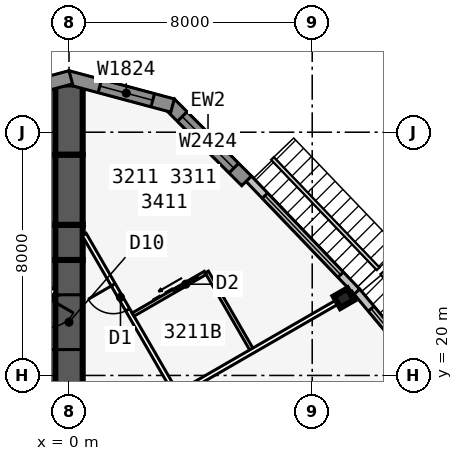
"""IFC4 building model, lengths in metres.
Left out: names, types, materials, properties, quantities, classifications, styles, units other than length and angle.
Written with IfcOpenShell. Run it as: python <this file> out.ifc"""

import sys

from ifc_helpers import new_model, si_unit, direction, frame, frame_2d, origin, origin_2d, place, context, subcontext, project, spatial, polyline, rectangle, i_section, outline, extrude, element, fill, save


model = new_model("IFC4")
c1 = context("Model", 3, precision=1e-05, world=origin(), true_north=direction((0.0, 1.0)))
c2 = subcontext(c1, "Body", "Model", "MODEL_VIEW")
j1 = project(units=[si_unit("LENGTHUNIT", "METRE"), si_unit("PLANEANGLEUNIT", "RADIAN")], contexts=[c1])
p1 = place(None, origin())
s1 = spatial("IfcSite", under=j1, at=p1, CompositionType="ELEMENT")
p2 = place(p1, origin())
s2 = spatial("IfcBuilding", under=s1, at=p2, CompositionType="ELEMENT")
p3 = place(p2, frame((0.0, 0.0, 124.9)))
s3 = spatial("IfcBuildingStorey", under=s2, at=p3, CompositionType="ELEMENT", Elevation=124.9)
p4 = place(p3, frame((0.0, 19.052, 0.0), z_axis=(0.0, 0.0, 1.0), x_axis=(0.0, 1.0, 0.0)))
e1 = element("IfcWall", 1, at=p4, inside=s3, PredefinedType="SHEAR", context=c2, shape_type="SweptSolid", body=[
    extrude(rectangle(XDim=4.746, YDim=0.9, at=frame_2d((2.373, 0.0))), origin(), (0.0, 0.0, 1.0), 3.4),
])
p5 = place(p4, frame((1.8, 0.0, 0.0)))
e2 = element("IfcOpeningElement", 2, at=p5, cuts=e1, PredefinedType="OPENING", context=c2, shape_type="SweptSolid", body=[
    extrude(rectangle(XDim=1.8, YDim=2.13, at=frame_2d((0.9, 1.065))), frame((0.0, 0.46, 0.0), z_axis=(0.0, -1.0, 0.0), x_axis=(1.0, 0.0, 0.0)), (0.0, 0.0, 1.0), 0.92),
])
p6 = place(p3, frame((0.0, 23.799, 0.0), z_axis=(0.0, 0.0, 1.0), x_axis=(0.0, 1.0, 0.0)))
e3 = element("IfcWall", 3, at=p6, inside=s3, PredefinedType="SHEAR", context=c2, shape_type="SweptSolid", body=[
    extrude(rectangle(XDim=1.155, YDim=0.9, at=frame_2d((0.577, 0.0))), origin(), (0.0, 0.0, 1.0), 3.4),
])
p7 = place(p3, frame((0.0, 24.953, 0.0), z_axis=(0.0, 0.0, 1.0), x_axis=(0.0, 1.0, 0.0)))
e4 = element("IfcWall", 4, at=p7, inside=s3, PredefinedType="SHEAR", context=c2, shape_type="SweptSolid", body=[
    extrude(rectangle(XDim=2.309, YDim=0.9, at=frame_2d((1.155, 0.0))), origin(), (0.0, 0.0, 1.0), 3.4),
])
p8 = place(p3, frame((0.0, 27.263, 0.0), z_axis=(0.0, 0.0, 1.0), x_axis=(0.0, 1.0, 0.0)))
e5 = element("IfcWall", 5, at=p8, inside=s3, PredefinedType="SHEAR", context=c2, shape_type="SweptSolid", body=[
    extrude(rectangle(XDim=2.31, YDim=0.9, at=frame_2d((1.155, 0.0))), origin(), (0.0, 0.0, 1.0), 3.4),
])
p9 = place(p3, frame((9.041, 22.541, 0.0), z_axis=(0.0, 0.0, 1.0), x_axis=(-0.5, 0.866025403784, 0.0)))
e6 = element("IfcColumn", 6, at=p9, inside=s3, PredefinedType="COLUMN", context=c2, shape_type="SweptSolid", body=[
    extrude(i_section(OverallWidth=0.437, OverallDepth=0.513, WebThickness=0.061, FlangeThickness=0.097, at=origin_2d()), origin(), (0.0, 0.0, 1.0), 3.4),
])
p10 = place(p3, frame((12.723, 18.868, 0.0), z_axis=(0.0, 0.0, 1.0), x_axis=(-0.641810386606, 0.766863369607, 0.0)))
e7 = element("IfcWall", 7, at=p10, inside=s3, PredefinedType="STANDARD", context=c2, shape_type="SweptSolid", body=[
    extrude(rectangle(XDim=5.076, YDim=0.25, at=frame_2d((2.538, 0.0))), origin(), (0.0, 0.0, 1.0), 3.235),
])
p11 = place(p10, frame((0.738, 0.0, 0.45)))
e8 = element("IfcOpeningElement", 8, at=p11, cuts=e7, PredefinedType="OPENING", context=c2, shape_type="SweptSolid", body=[
    extrude(rectangle(XDim=3.6, YDim=2.4, at=frame_2d((1.8, 1.2))), frame((0.0, 0.135, 0.0), z_axis=(0.0, -1.0, 0.0), x_axis=(1.0, 0.0, 0.0)), (0.0, 0.0, 1.0), 0.27),
])
p12 = place(p3, frame((9.471, 22.754, 0.0), z_axis=(0.0, 0.0, 1.0), x_axis=(-0.691719937936, 0.722165858693, 0.0)))
e9 = element("IfcWall", 9, at=p12, inside=s3, PredefinedType="STANDARD", context=c2, shape_type="SweptSolid", body=[
    extrude(rectangle(XDim=5.148, YDim=0.25, at=frame_2d((2.574, 0.0))), origin(), (0.0, 0.0, 1.0), 3.235),
])
p13 = place(p12, frame((0.774, 0.0, 0.45)))
e10 = element("IfcOpeningElement", 10, at=p13, cuts=e9, PredefinedType="OPENING", context=c2, shape_type="SweptSolid", body=[
    extrude(rectangle(XDim=3.6, YDim=2.4, at=frame_2d((1.8, 1.2))), frame((0.0, 0.135, 0.0), z_axis=(0.0, -1.0, 0.0), x_axis=(1.0, 0.0, 0.0)), (0.0, 0.0, 1.0), 0.27),
])
p14 = place(p3, frame((5.841, 26.399, 0.0), z_axis=(0.0, 0.0, 1.0), x_axis=(-0.707106781187, 0.707106781187, 0.0)))
e11 = element("IfcWall", 11, at=p14, inside=s3, PredefinedType="SOLIDWALL", context=c2, shape_type="SweptSolid", body=[
    extrude(rectangle(XDim=3.586, YDim=0.45, at=frame_2d((1.793, 0.0))), origin(), (0.0, 0.0, 1.0), 3.235),
])
p15 = place(p14, frame((0.593, 0.0, 0.45)))
e12 = element("IfcOpeningElement", 12, at=p15, cuts=e11, PredefinedType="OPENING", context=c2, shape_type="SweptSolid", body=[
    extrude(rectangle(XDim=2.4, YDim=2.4, at=frame_2d((1.2, 1.2))), frame((0.0, 0.235, 0.0), z_axis=(0.0, -1.0, 0.0), x_axis=(1.0, 0.0, 0.0)), (0.0, 0.0, 1.0), 0.47),
])
p16 = place(p3, frame((3.406, 28.877, 0.0), z_axis=(0.0, 0.0, 1.0), x_axis=(-0.965924653531, 0.258823421857, 0.0)))
e13 = element("IfcWall", 13, at=p16, inside=s3, PredefinedType="SOLIDWALL", context=c2, shape_type="SweptSolid", body=[
    extrude(outline(polyline([(3.586, 0.225), (3.527, 0.225), (3.035, 0.093), (3.0, 0.225), (0.0, 0.225), (0.0, -0.225), (3.586, -0.225), (3.586, 0.225)])), origin(), (0.0, 0.0, 1.0), 3.235),
])
p17 = place(p16, frame((0.675, 0.0, 0.45)))
e14 = element("IfcOpeningElement", 14, at=p17, cuts=e13, PredefinedType="OPENING", context=c2, shape_type="SweptSolid", body=[
    extrude(rectangle(XDim=1.8, YDim=2.4, at=frame_2d((0.9, 1.2))), frame((0.0, 0.235, 0.0), z_axis=(0.0, -1.0, 0.0), x_axis=(1.0, 0.0, 0.0)), (0.0, 0.0, 1.0), 0.47),
])
p18 = place(p3, frame((0.058, 29.805, 0.0), z_axis=(0.0, 0.0, 1.0), x_axis=(-0.965924653531, -0.258823421857, 0.0)))
e15 = element("IfcWall", 15, at=p18, inside=s3, PredefinedType="SOLIDWALL", context=c2, shape_type="SweptSolid", body=[
    extrude(outline(polyline([(3.586, 0.225), (0.586, 0.225), (0.551, 0.093), (0.06, 0.225), (0.0, 0.225), (0.0, -0.225), (3.586, -0.225), (3.586, 0.225)])), origin(), (0.0, 0.0, 1.0), 3.235),
])
p19 = place(p18, frame((1.111, 0.0, 0.45)))
e16 = element("IfcOpeningElement", 16, at=p19, cuts=e15, PredefinedType="OPENING", context=c2, shape_type="SweptSolid", body=[
    extrude(rectangle(XDim=1.8, YDim=2.4, at=frame_2d((0.9, 1.2))), frame((0.0, 0.235, 0.0), z_axis=(0.0, -1.0, 0.0), x_axis=(1.0, 0.0, 0.0)), (0.0, 0.0, 1.0), 0.47),
])
p20 = place(p3, frame((21.586, -11.885, 0.0), z_axis=(0.0, 0.0, 1.0), x_axis=(-0.500001915564, 0.86602429783, 0.0)))
e17 = element("IfcWall", 17, at=p20, inside=s3, PredefinedType="PARTITIONING", context=c2, shape_type="SweptSolid", body=[
    extrude(rectangle(XDim=42.172, YDim=0.15, at=frame_2d((21.086, 0.0))), origin(), (0.0, 0.0, 1.0), 3.235),
])
p21 = place(p20, frame((1.911, 0.0, 0.0)))
e18 = element("IfcOpeningElement", 18, at=p21, cuts=e17, PredefinedType="OPENING", context=c2, shape_type="SweptSolid", body=[
    extrude(rectangle(XDim=0.95, YDim=2.13, at=frame_2d((0.475, 1.065))), frame((0.0, 0.085, 0.0), z_axis=(0.0, -1.0, 0.0), x_axis=(1.0, 0.0, 0.0)), (0.0, 0.0, 1.0), 0.17),
])
p22 = place(p20, frame((7.511, 0.0, 0.0)))
e19 = element("IfcOpeningElement", 19, at=p22, cuts=e17, PredefinedType="OPENING", context=c2, shape_type="SweptSolid", body=[
    extrude(rectangle(XDim=0.95, YDim=2.13, at=frame_2d((0.475, 1.065))), frame((0.0, 0.085, 0.0), z_axis=(0.0, -1.0, 0.0), x_axis=(1.0, 0.0, 0.0)), (0.0, 0.0, 1.0), 0.17),
])
p23 = place(p20, frame((14.311, 0.0, 0.0)))
e20 = element("IfcOpeningElement", 20, at=p23, cuts=e17, PredefinedType="OPENING", context=c2, shape_type="SweptSolid", body=[
    extrude(rectangle(XDim=0.95, YDim=2.13, at=frame_2d((0.475, 1.065))), frame((0.0, 0.085, 0.0), z_axis=(0.0, -1.0, 0.0), x_axis=(1.0, 0.0, 0.0)), (0.0, 0.0, 1.0), 0.17),
])
p24 = place(p20, frame((22.511, 0.0, 0.0)))
e21 = element("IfcOpeningElement", 21, at=p24, cuts=e17, PredefinedType="OPENING", context=c2, shape_type="SweptSolid", body=[
    extrude(rectangle(XDim=0.95, YDim=2.13, at=frame_2d((0.475, 1.065))), frame((0.0, 0.085, 0.0), z_axis=(0.0, -1.0, 0.0), x_axis=(1.0, 0.0, 0.0)), (0.0, 0.0, 1.0), 0.17),
])
p25 = place(p20, frame((29.311, 0.0, 0.0)))
e22 = element("IfcOpeningElement", 22, at=p25, cuts=e17, PredefinedType="OPENING", context=c2, shape_type="SweptSolid", body=[
    extrude(rectangle(XDim=0.95, YDim=2.13, at=frame_2d((0.475, 1.065))), frame((0.0, 0.085, 0.0), z_axis=(0.0, -1.0, 0.0), x_axis=(1.0, 0.0, 0.0)), (0.0, 0.0, 1.0), 0.17),
])
p26 = place(p20, frame((39.311, 0.0, 0.0)))
e23 = element("IfcOpeningElement", 23, at=p26, cuts=e17, PredefinedType="OPENING", context=c2, shape_type="SweptSolid", body=[
    extrude(rectangle(XDim=0.95, YDim=2.13, at=frame_2d((0.475, 1.065))), frame((0.0, 0.085, 0.0), z_axis=(0.0, -1.0, 0.0), x_axis=(1.0, 0.0, 0.0)), (0.0, 0.0, 1.0), 0.17),
])
p27 = place(p3, frame((3.608, 19.404, 0.0), z_axis=(0.0, 0.0, 1.0), x_axis=(0.866015989873, 0.500016305018, 0.0)))
e24 = element("IfcWall", 24, at=p27, inside=s3, PredefinedType="PARTITIONING", context=c2, shape_type="SweptSolid", body=[
    extrude(rectangle(XDim=6.616, YDim=0.15, at=frame_2d((3.308, 0.0))), origin(), (0.0, 0.0, 1.0), 2.389),
])
p28 = place(p3, frame((6.033, 20.803, 0.0), z_axis=(0.0, 0.0, 1.0), x_axis=(-0.499990139034, 0.866031096941, 0.0)))
e25 = element("IfcWall", 25, at=p28, inside=s3, PredefinedType="PLUMBINGWALL", context=c2, shape_type="SweptSolid", body=[
    extrude(rectangle(XDim=3.0, YDim=0.12, at=frame_2d((1.5, 0.0))), origin(), (0.0, 0.0, 1.0), 3.235),
])
p29 = place(p3, frame((2.108, 22.002, 0.0), z_axis=(0.0, 0.0, 1.0), x_axis=(0.866035715982, 0.499982138324, 0.0)))
e26 = element("IfcWall", 26, at=p29, inside=s3, PredefinedType="PLUMBINGWALL", context=c2, shape_type="SweptSolid", body=[
    extrude(rectangle(XDim=2.74, YDim=0.12, at=frame_2d((1.37, 0.0))), origin(), (0.0, 0.0, 1.0), 3.235),
])
p30 = place(p29, frame((1.55, 0.0, 0.0)))
e27 = element("IfcOpeningElement", 27, at=p30, cuts=e26, PredefinedType="OPENING", context=c2, shape_type="SweptSolid", body=[
    extrude(rectangle(XDim=0.9, YDim=2.13, at=frame_2d((0.45, 1.065))), frame((0.0, 0.07, 0.0), z_axis=(0.0, -1.0, 0.0), x_axis=(1.0, 0.0, 0.0)), (0.0, 0.0, 1.0), 0.14),
])
p31 = place(p3, frame((-0.5, 22.836, 0.0), z_axis=(0.0, 0.0, 1.0), x_axis=(-0.500001677587, -0.866024435227, 0.0)))
e28 = element("IfcWall", 28, at=p31, inside=s3, PredefinedType="PARTITIONING", context=c2, shape_type="SweptSolid", body=[
    extrude(rectangle(XDim=39.054, YDim=0.15, at=frame_2d((19.527, 0.0))), origin(), (0.0, 0.0, 1.0), 3.235),
])
p32 = place(p31, frame((0.352, 0.0, 0.0)))
e29 = element("IfcOpeningElement", 29, at=p32, cuts=e28, PredefinedType="OPENING", context=c2, shape_type="SweptSolid", body=[
    extrude(rectangle(XDim=0.95, YDim=2.13, at=frame_2d((0.475, 1.065))), frame((0.0, 0.085, 0.0), z_axis=(0.0, -1.0, 0.0), x_axis=(1.0, 0.0, 0.0)), (0.0, 0.0, 1.0), 0.17),
])
p33 = place(p31, frame((5.952, 0.0, 0.0)))
e30 = element("IfcOpeningElement", 30, at=p33, cuts=e28, PredefinedType="OPENING", context=c2, shape_type="SweptSolid", body=[
    extrude(rectangle(XDim=0.95, YDim=2.13, at=frame_2d((0.475, 1.065))), frame((0.0, 0.085, 0.0), z_axis=(0.0, -1.0, 0.0), x_axis=(1.0, 0.0, 0.0)), (0.0, 0.0, 1.0), 0.17),
])
p34 = place(p31, frame((12.152, 0.0, 0.0)))
e31 = element("IfcOpeningElement", 31, at=p34, cuts=e28, PredefinedType="OPENING", context=c2, shape_type="SweptSolid", body=[
    extrude(rectangle(XDim=0.95, YDim=2.13, at=frame_2d((0.475, 1.065))), frame((0.0, 0.085, 0.0), z_axis=(0.0, -1.0, 0.0), x_axis=(1.0, 0.0, 0.0)), (0.0, 0.0, 1.0), 0.17),
])
p35 = place(p31, frame((15.352, 0.0, 0.0)))
e32 = element("IfcOpeningElement", 32, at=p35, cuts=e28, PredefinedType="OPENING", context=c2, shape_type="SweptSolid", body=[
    extrude(rectangle(XDim=0.95, YDim=2.13, at=frame_2d((0.475, 1.065))), frame((0.0, 0.085, 0.0), z_axis=(0.0, -1.0, 0.0), x_axis=(1.0, 0.0, 0.0)), (0.0, 0.0, 1.0), 0.17),
])
p36 = place(p31, frame((22.152, 0.0, 0.0)))
e33 = element("IfcOpeningElement", 33, at=p36, cuts=e28, PredefinedType="OPENING", context=c2, shape_type="SweptSolid", body=[
    extrude(rectangle(XDim=0.95, YDim=2.13, at=frame_2d((0.475, 1.065))), frame((0.0, 0.085, 0.0), z_axis=(0.0, -1.0, 0.0), x_axis=(1.0, 0.0, 0.0)), (0.0, 0.0, 1.0), 0.17),
])
p37 = place(p31, frame((30.352, 0.0, 0.0)))
e34 = element("IfcOpeningElement", 34, at=p37, cuts=e28, PredefinedType="OPENING", context=c2, shape_type="SweptSolid", body=[
    extrude(rectangle(XDim=0.95, YDim=2.13, at=frame_2d((0.475, 1.065))), frame((0.0, 0.085, 0.0), z_axis=(0.0, -1.0, 0.0), x_axis=(1.0, 0.0, 0.0)), (0.0, 0.0, 1.0), 0.17),
])
p38 = place(p31, frame((37.752, 0.0, 0.0)))
e35 = element("IfcOpeningElement", 35, at=p38, cuts=e28, PredefinedType="OPENING", context=c2, shape_type="SweptSolid", body=[
    extrude(rectangle(XDim=0.95, YDim=2.13, at=frame_2d((0.475, 1.065))), frame((0.0, 0.085, 0.0), z_axis=(0.0, -1.0, 0.0), x_axis=(1.0, 0.0, 0.0)), (0.0, 0.0, 1.0), 0.17),
])
p39 = place(p11, origin())
e36 = element("IfcWindow", 36, at=p39, inside=s3, PartitioningType="SINGLE_PANEL", PredefinedType="WINDOW", context=c2, shape_type="SweptSolid", body=[
    extrude(rectangle(XDim=3.6, YDim=2.4, at=frame_2d((1.8, 1.2))), frame((0.0, 0.03, 0.0), z_axis=(0.0, -1.0, 0.0), x_axis=(1.0, 0.0, 0.0)), (0.0, 0.0, 1.0), 0.06),
])
fill(e8, e36)
p40 = place(p13, origin())
e37 = element("IfcWindow", 37, at=p40, inside=s3, PartitioningType="SINGLE_PANEL", PredefinedType="WINDOW", context=c2, shape_type="SweptSolid", body=[
    extrude(rectangle(XDim=3.6, YDim=2.4, at=frame_2d((1.8, 1.2))), frame((0.0, 0.03, 0.0), z_axis=(0.0, -1.0, 0.0), x_axis=(1.0, 0.0, 0.0)), (0.0, 0.0, 1.0), 0.06),
])
fill(e10, e37)
p41 = place(p15, origin())
e38 = element("IfcWindow", 38, at=p41, inside=s3, PartitioningType="SINGLE_PANEL", PredefinedType="WINDOW", context=c2, shape_type="SweptSolid", body=[
    extrude(rectangle(XDim=2.4, YDim=2.4, at=frame_2d((1.2, 1.2))), frame((0.0, 0.03, 0.0), z_axis=(0.0, -1.0, 0.0), x_axis=(1.0, 0.0, 0.0)), (0.0, 0.0, 1.0), 0.06),
])
fill(e12, e38)
p42 = place(p17, origin())
e39 = element("IfcWindow", 39, at=p42, inside=s3, PartitioningType="SINGLE_PANEL", PredefinedType="WINDOW", context=c2, shape_type="SweptSolid", body=[
    extrude(rectangle(XDim=1.8, YDim=2.4, at=frame_2d((0.9, 1.2))), frame((0.0, 0.03, 0.0), z_axis=(0.0, -1.0, 0.0), x_axis=(1.0, 0.0, 0.0)), (0.0, 0.0, 1.0), 0.06),
])
fill(e14, e39)
p43 = place(p30, origin())
e40 = element("IfcDoor", 40, at=p43, inside=s3, OperationType="SLIDING_TO_LEFT", PredefinedType="DOOR", context=c2, shape_type="SweptSolid", body=[
    extrude(rectangle(XDim=0.9, YDim=2.13, at=frame_2d((0.45, 1.065))), frame((0.0, 0.025, 0.0), z_axis=(0.0, -1.0, 0.0), x_axis=(1.0, 0.0, 0.0)), (0.0, 0.0, 1.0), 0.05),
])
fill(e27, e40)
p44 = place(p26, origin())
e41 = element("IfcDoor", 41, at=p44, inside=s3, OperationType="SINGLE_SWING_RIGHT", PredefinedType="DOOR", context=c2, shape_type="SweptSolid", body=[
    extrude(rectangle(XDim=0.95, YDim=2.13, at=frame_2d((0.475, 1.065))), frame((0.0, 0.025, 0.0), z_axis=(0.0, -1.0, 0.0), x_axis=(1.0, 0.0, 0.0)), (0.0, 0.0, 1.0), 0.05),
])
fill(e23, e41)
p45 = place(p5, origin())
e42 = element("IfcDoor", 42, at=p45, inside=s3, OperationType="DOUBLE_DOOR_DOUBLE_SWING", PredefinedType="DOOR", context=c2, shape_type="SweptSolid", body=[
    extrude(rectangle(XDim=1.8, YDim=2.13, at=frame_2d((0.9, 1.065))), frame((0.0, 0.025, 0.0), z_axis=(0.0, -1.0, 0.0), x_axis=(1.0, 0.0, 0.0)), (0.0, 0.0, 1.0), 0.05),
])
fill(e2, e42)
save(model, sys.argv[1])
